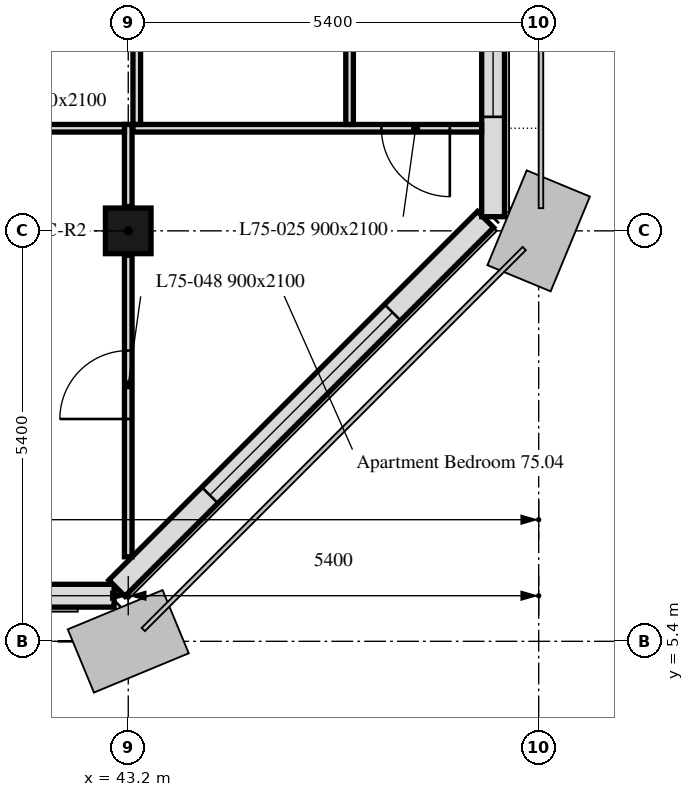
"""IFC4 building model, lengths in metres.
Left out: names, types, materials, properties, quantities, classifications, styles, units other than length and angle.
Written with IfcOpenShell. Run it as: python <this file> out.ifc"""

import sys

from ifc_helpers import new_model, si_unit, direction, frame, frame_2d, origin, origin_2d, place, context, subcontext, project, spatial, rectangle, extrude, element, fill, save


model = new_model("IFC4")
c1 = context("Model", 3, precision=1e-05, world=origin(), true_north=direction((0.0, 1.0)))
c2 = subcontext(c1, "Body", "Model", "MODEL_VIEW")
j1 = project(units=[si_unit("LENGTHUNIT", "METRE"), si_unit("PLANEANGLEUNIT", "RADIAN")], contexts=[c1])
p1 = place(None, origin())
s1 = spatial("IfcSite", under=j1, at=p1, CompositionType="ELEMENT")
p2 = place(p1, origin())
s2 = spatial("IfcBuilding", under=s1, at=p2, CompositionType="ELEMENT")
p3 = place(p2, frame((0.0, 0.0, 301.6)))
s3 = spatial("IfcBuildingStorey", under=s2, at=p3, CompositionType="ELEMENT", Elevation=301.6)
p4 = place(p3, frame((43.2, 10.8, 0.0), z_axis=(0.0, 0.0, 1.0), x_axis=(1.0, 0.0, 0.0)))
e1 = element("IfcColumn", 1, at=p4, inside=s3, PredefinedType="COLUMN", context=c2, shape_type="SweptSolid", body=[
    extrude(rectangle(XDim=0.6, YDim=0.6, at=origin_2d()), origin(), (0.0, 0.0, 1.0), 3.0),
])
p5 = place(p3, frame((10.986, 6.0, 0.0), z_axis=(0.0, 0.0, 1.0), x_axis=(1.0, 0.0, 0.0)))
e2 = element("IfcWall", 2, at=p5, inside=s3, PredefinedType="SOLIDWALL", context=c2, shape_type="SweptSolid", body=[
    extrude(rectangle(XDim=32.027, YDim=0.3, at=frame_2d((16.014, 0.0))), origin(), (0.0, 0.0, 1.0), 3.0),
])
p6 = place(p5, frame((0.814, 0.0, 0.9)))
e3 = element("IfcOpeningElement", 3, at=p6, cuts=e2, PredefinedType="OPENING", context=c2, shape_type="SweptSolid", body=[
    extrude(rectangle(XDim=3.4, YDim=1.7, at=frame_2d((1.7, 0.85))), frame((0.0, 0.16, 0.0), z_axis=(0.0, -1.0, 0.0), x_axis=(1.0, 0.0, 0.0)), (0.0, 0.0, 1.0), 0.32),
])
p7 = place(p5, frame((6.564, 0.0, 0.9)))
e4 = element("IfcOpeningElement", 4, at=p7, cuts=e2, PredefinedType="OPENING", context=c2, shape_type="SweptSolid", body=[
    extrude(rectangle(XDim=1.1, YDim=1.7, at=frame_2d((0.55, 0.85))), frame((0.0, 0.16, 0.0), z_axis=(0.0, -1.0, 0.0), x_axis=(1.0, 0.0, 0.0)), (0.0, 0.0, 1.0), 0.32),
])
p8 = place(p5, frame((11.614, 0.0, 0.9)))
e5 = element("IfcOpeningElement", 5, at=p8, cuts=e2, PredefinedType="OPENING", context=c2, shape_type="SweptSolid", body=[
    extrude(rectangle(XDim=3.4, YDim=1.7, at=frame_2d((1.7, 0.85))), frame((0.0, 0.16, 0.0), z_axis=(0.0, -1.0, 0.0), x_axis=(1.0, 0.0, 0.0)), (0.0, 0.0, 1.0), 0.32),
])
p9 = place(p5, frame((17.364, 0.0, 0.9)))
e6 = element("IfcOpeningElement", 6, at=p9, cuts=e2, PredefinedType="OPENING", context=c2, shape_type="SweptSolid", body=[
    extrude(rectangle(XDim=1.1, YDim=1.7, at=frame_2d((0.55, 0.85))), frame((0.0, 0.16, 0.0), z_axis=(0.0, -1.0, 0.0), x_axis=(1.0, 0.0, 0.0)), (0.0, 0.0, 1.0), 0.32),
])
p10 = place(p5, frame((22.414, 0.0, 0.9)))
e7 = element("IfcOpeningElement", 7, at=p10, cuts=e2, PredefinedType="OPENING", context=c2, shape_type="SweptSolid", body=[
    extrude(rectangle(XDim=3.4, YDim=1.7, at=frame_2d((1.7, 0.85))), frame((0.0, 0.16, 0.0), z_axis=(0.0, -1.0, 0.0), x_axis=(1.0, 0.0, 0.0)), (0.0, 0.0, 1.0), 0.32),
])
p11 = place(p5, frame((28.164, 0.0, 0.9)))
e8 = element("IfcOpeningElement", 8, at=p11, cuts=e2, PredefinedType="OPENING", context=c2, shape_type="SweptSolid", body=[
    extrude(rectangle(XDim=1.1, YDim=1.7, at=frame_2d((0.55, 0.85))), frame((0.0, 0.16, 0.0), z_axis=(0.0, -1.0, 0.0), x_axis=(1.0, 0.0, 0.0)), (0.0, 0.0, 1.0), 0.32),
])
p12 = place(p3, frame((43.051, 6.099, 0.0), z_axis=(0.0, 0.0, 1.0), x_axis=(0.707106781187, 0.707106781187, 0.0)))
e9 = element("IfcWall", 9, at=p12, inside=s3, PredefinedType="SOLIDWALL", context=c2, shape_type="SweptSolid", body=[
    extrude(rectangle(XDim=6.86, YDim=0.3, at=frame_2d((3.43, 0.0))), origin(), (0.0, 0.0, 1.0), 3.0),
])
p13 = place(p12, frame((1.73, 0.0, 0.9)))
e10 = element("IfcOpeningElement", 10, at=p13, cuts=e9, PredefinedType="OPENING", context=c2, shape_type="SweptSolid", body=[
    extrude(rectangle(XDim=3.4, YDim=1.7, at=frame_2d((1.7, 0.85))), frame((0.0, 0.16, 0.0), z_axis=(0.0, -1.0, 0.0), x_axis=(1.0, 0.0, 0.0)), (0.0, 0.0, 1.0), 0.32),
])
p14 = place(p3, frame((48.0, 10.986, 0.0), z_axis=(0.0, 0.0, 1.0), x_axis=(0.0, 1.0, 0.0)))
e11 = element("IfcWall", 11, at=p14, inside=s3, PredefinedType="SOLIDWALL", context=c2, shape_type="SweptSolid", body=[
    extrude(rectangle(XDim=32.027, YDim=0.3, at=frame_2d((16.014, 0.0))), origin(), (0.0, 0.0, 1.0), 3.0),
])
p15 = place(p14, frame((1.314, 0.0, 0.9)))
e12 = element("IfcOpeningElement", 12, at=p15, cuts=e11, PredefinedType="OPENING", context=c2, shape_type="SweptSolid", body=[
    extrude(rectangle(XDim=1.1, YDim=1.7, at=frame_2d((0.55, 0.85))), frame((0.0, 0.16, 0.0), z_axis=(0.0, -1.0, 0.0), x_axis=(1.0, 0.0, 0.0)), (0.0, 0.0, 1.0), 0.32),
])
p16 = place(p14, frame((2.589, 0.0, 0.9)))
e13 = element("IfcOpeningElement", 13, at=p16, cuts=e11, PredefinedType="OPENING", context=c2, shape_type="SweptSolid", body=[
    extrude(rectangle(XDim=0.65, YDim=1.7, at=frame_2d((0.325, 0.85))), frame((0.0, 0.16, 0.0), z_axis=(0.0, -1.0, 0.0), x_axis=(1.0, 0.0, 0.0)), (0.0, 0.0, 1.0), 0.32),
])
p17 = place(p14, frame((6.564, 0.0, 0.9)))
e14 = element("IfcOpeningElement", 14, at=p17, cuts=e11, PredefinedType="OPENING", context=c2, shape_type="SweptSolid", body=[
    extrude(rectangle(XDim=1.1, YDim=1.7, at=frame_2d((0.55, 0.85))), frame((0.0, 0.16, 0.0), z_axis=(0.0, -1.0, 0.0), x_axis=(1.0, 0.0, 0.0)), (0.0, 0.0, 1.0), 0.32),
])
p18 = place(p14, frame((8.164, 0.0, 0.9)))
e15 = element("IfcOpeningElement", 15, at=p18, cuts=e11, PredefinedType="OPENING", context=c2, shape_type="SweptSolid", body=[
    extrude(rectangle(XDim=1.1, YDim=1.7, at=frame_2d((0.55, 0.85))), frame((0.0, 0.16, 0.0), z_axis=(0.0, -1.0, 0.0), x_axis=(1.0, 0.0, 0.0)), (0.0, 0.0, 1.0), 0.32),
])
p19 = place(p14, frame((11.614, 0.0, 0.9)))
e16 = element("IfcOpeningElement", 16, at=p19, cuts=e11, PredefinedType="OPENING", context=c2, shape_type="SweptSolid", body=[
    extrude(rectangle(XDim=3.4, YDim=1.7, at=frame_2d((1.7, 0.85))), frame((0.0, 0.16, 0.0), z_axis=(0.0, -1.0, 0.0), x_axis=(1.0, 0.0, 0.0)), (0.0, 0.0, 1.0), 0.32),
])
p20 = place(p14, frame((17.364, 0.0, 0.9)))
e17 = element("IfcOpeningElement", 17, at=p20, cuts=e11, PredefinedType="OPENING", context=c2, shape_type="SweptSolid", body=[
    extrude(rectangle(XDim=1.1, YDim=1.7, at=frame_2d((0.55, 0.85))), frame((0.0, 0.16, 0.0), z_axis=(0.0, -1.0, 0.0), x_axis=(1.0, 0.0, 0.0)), (0.0, 0.0, 1.0), 0.32),
])
p21 = place(p14, frame((18.964, 0.0, 0.9)))
e18 = element("IfcOpeningElement", 18, at=p21, cuts=e11, PredefinedType="OPENING", context=c2, shape_type="SweptSolid", body=[
    extrude(rectangle(XDim=1.1, YDim=1.7, at=frame_2d((0.55, 0.85))), frame((0.0, 0.16, 0.0), z_axis=(0.0, -1.0, 0.0), x_axis=(1.0, 0.0, 0.0)), (0.0, 0.0, 1.0), 0.32),
])
p22 = place(p14, frame((23.389, 0.0, 0.9)))
e19 = element("IfcOpeningElement", 19, at=p22, cuts=e11, PredefinedType="OPENING", context=c2, shape_type="SweptSolid", body=[
    extrude(rectangle(XDim=0.65, YDim=1.7, at=frame_2d((0.325, 0.85))), frame((0.0, 0.16, 0.0), z_axis=(0.0, -1.0, 0.0), x_axis=(1.0, 0.0, 0.0)), (0.0, 0.0, 1.0), 0.32),
])
p23 = place(p14, frame((24.364, 0.0, 0.9)))
e20 = element("IfcOpeningElement", 20, at=p23, cuts=e11, PredefinedType="OPENING", context=c2, shape_type="SweptSolid", body=[
    extrude(rectangle(XDim=1.1, YDim=1.7, at=frame_2d((0.55, 0.85))), frame((0.0, 0.16, 0.0), z_axis=(0.0, -1.0, 0.0), x_axis=(1.0, 0.0, 0.0)), (0.0, 0.0, 1.0), 0.32),
])
p24 = place(p14, frame((28.164, 0.0, 0.9)))
e21 = element("IfcOpeningElement", 21, at=p24, cuts=e11, PredefinedType="OPENING", context=c2, shape_type="SweptSolid", body=[
    extrude(rectangle(XDim=1.1, YDim=1.7, at=frame_2d((0.55, 0.85))), frame((0.0, 0.16, 0.0), z_axis=(0.0, -1.0, 0.0), x_axis=(1.0, 0.0, 0.0)), (0.0, 0.0, 1.0), 0.32),
])
p25 = place(p14, frame((29.764, 0.0, 0.9)))
e22 = element("IfcOpeningElement", 22, at=p25, cuts=e11, PredefinedType="OPENING", context=c2, shape_type="SweptSolid", body=[
    extrude(rectangle(XDim=1.1, YDim=1.7, at=frame_2d((0.55, 0.85))), frame((0.0, 0.16, 0.0), z_axis=(0.0, -1.0, 0.0), x_axis=(1.0, 0.0, 0.0)), (0.0, 0.0, 1.0), 0.32),
])
p26 = place(p3, frame((43.2, 6.512, 0.0), z_axis=(0.0, 0.0, 1.0), x_axis=(0.0, 1.0, 0.0)))
e23 = element("IfcWall", 23, at=p26, inside=s3, PredefinedType="PARTITIONING", context=c2, shape_type="SweptSolid", body=[
    extrude(rectangle(XDim=3.968, YDim=0.1, at=frame_2d((1.984, 0.0))), origin(), (0.0, 0.0, 1.0), 3.0),
])
p27 = place(p26, frame((1.813, 0.0, 0.0)))
e24 = element("IfcOpeningElement", 24, at=p27, cuts=e23, PredefinedType="OPENING", context=c2, shape_type="SweptSolid", body=[
    extrude(rectangle(XDim=0.9, YDim=2.1, at=frame_2d((0.45, 1.05))), frame((0.0, 0.05, 0.0), z_axis=(0.0, -1.0, 0.0), x_axis=(1.0, 0.0, 0.0)), (0.0, 0.0, 1.0), 0.1),
])
p28 = place(p3, frame((43.2, 11.12, 0.0), z_axis=(0.0, 0.0, 1.0), x_axis=(0.0, 1.0, 0.0)))
e25 = element("IfcWall", 25, at=p28, inside=s3, PredefinedType="PARTITIONING", context=c2, shape_type="SweptSolid", body=[
    extrude(rectangle(XDim=1.08, YDim=0.1, at=frame_2d((0.54, 0.0))), origin(), (0.0, 0.0, 1.0), 3.0),
])
p29 = place(p3, frame((43.15, 12.15, 0.0), z_axis=(0.0, 0.0, 1.0), x_axis=(-1.0, 0.0, 0.0)))
e26 = element("IfcWall", 26, at=p29, inside=s3, PredefinedType="PARTITIONING", context=c2, shape_type="SweptSolid", body=[
    extrude(rectangle(XDim=5.275, YDim=0.1, at=frame_2d((2.637, 0.0))), origin(), (0.0, 0.0, 1.0), 3.0),
])
p30 = place(p29, frame((3.017, 0.0, 0.0)))
e27 = element("IfcOpeningElement", 27, at=p30, cuts=e26, PredefinedType="OPENING", context=c2, shape_type="SweptSolid", body=[
    extrude(rectangle(XDim=0.9, YDim=2.1, at=frame_2d((0.45, 1.05))), frame((0.0, 0.05, 0.0), z_axis=(0.0, -1.0, 0.0), x_axis=(1.0, 0.0, 0.0)), (0.0, 0.0, 1.0), 0.1),
])
p31 = place(p29, frame((1.517, 0.0, 0.0)))
e28 = element("IfcOpeningElement", 28, at=p31, cuts=e26, PredefinedType="OPENING", context=c2, shape_type="SweptSolid", body=[
    extrude(rectangle(XDim=0.9, YDim=2.1, at=frame_2d((0.45, 1.05))), frame((0.0, 0.05, 0.0), z_axis=(0.0, -1.0, 0.0), x_axis=(1.0, 0.0, 0.0)), (0.0, 0.0, 1.0), 0.1),
])
p32 = place(p3, frame((47.849, 12.15, 0.0), z_axis=(0.0, 0.0, 1.0), x_axis=(-1.0, 0.0, 0.0)))
e29 = element("IfcWall", 29, at=p32, inside=s3, PredefinedType="PARTITIONING", context=c2, shape_type="SweptSolid", body=[
    extrude(rectangle(XDim=4.587, YDim=0.1, at=frame_2d((2.293, 0.0))), origin(), (0.0, 0.0, 1.0), 3.0),
])
p33 = place(p32, frame((0.418, 0.0, 0.0)))
e30 = element("IfcOpeningElement", 30, at=p33, cuts=e29, PredefinedType="OPENING", context=c2, shape_type="SweptSolid", body=[
    extrude(rectangle(XDim=0.9, YDim=2.1, at=frame_2d((0.45, 1.05))), frame((0.0, 0.05, 0.0), z_axis=(0.0, -1.0, 0.0), x_axis=(1.0, 0.0, 0.0)), (0.0, 0.0, 1.0), 0.1),
])
p34 = place(p3, frame((43.312, 12.2, 0.0), z_axis=(0.0, 0.0, 1.0), x_axis=(0.0, 1.0, 0.0)))
e31 = element("IfcWall", 31, at=p34, inside=s3, PredefinedType="PARTITIONING", context=c2, shape_type="SweptSolid", body=[
    extrude(rectangle(XDim=2.125, YDim=0.1, at=frame_2d((1.062, 0.0))), origin(), (0.0, 0.0, 1.0), 3.0),
])
p35 = place(p34, frame((0.975, 0.0, 0.0)))
e32 = element("IfcOpeningElement", 32, at=p35, cuts=e31, PredefinedType="OPENING", context=c2, shape_type="SweptSolid", body=[
    extrude(rectangle(XDim=0.9, YDim=2.1, at=frame_2d((0.45, 1.05))), frame((0.0, 0.05, 0.0), z_axis=(0.0, -1.0, 0.0), x_axis=(1.0, 0.0, 0.0)), (0.0, 0.0, 1.0), 0.1),
])
p36 = place(p3, frame((46.112, 12.2, 0.0), z_axis=(0.0, 0.0, 1.0), x_axis=(0.0, 1.0, 0.0)))
e33 = element("IfcWall", 33, at=p36, inside=s3, PredefinedType="PARTITIONING", context=c2, shape_type="SweptSolid", body=[
    extrude(rectangle(XDim=2.125, YDim=0.1, at=frame_2d((1.062, 0.0))), origin(), (0.0, 0.0, 1.0), 3.0),
])
p37 = place(p13, origin())
e34 = element("IfcWindow", 34, at=p37, inside=s3, PartitioningType="SINGLE_PANEL", PredefinedType="WINDOW", context=c2, shape_type="SweptSolid", body=[
    extrude(rectangle(XDim=3.4, YDim=1.7, at=frame_2d((1.7, 0.85))), frame((0.0, 0.03, 0.0), z_axis=(0.0, -1.0, 0.0), x_axis=(1.0, 0.0, 0.0)), (0.0, 0.0, 1.0), 0.06),
])
fill(e10, e34)
p38 = place(p15, origin())
e35 = element("IfcWindow", 35, at=p38, inside=s3, PartitioningType="SINGLE_PANEL", PredefinedType="WINDOW", context=c2, shape_type="SweptSolid", body=[
    extrude(rectangle(XDim=1.1, YDim=1.7, at=frame_2d((0.55, 0.85))), frame((0.0, 0.03, 0.0), z_axis=(0.0, -1.0, 0.0), x_axis=(1.0, 0.0, 0.0)), (0.0, 0.0, 1.0), 0.06),
])
fill(e12, e35)
p39 = place(p33, origin())
e36 = element("IfcDoor", 36, at=p39, inside=s3, OperationType="SINGLE_SWING_LEFT", PredefinedType="DOOR", context=c2, shape_type="SweptSolid", body=[
    extrude(rectangle(XDim=0.9, YDim=2.1, at=frame_2d((0.45, 1.05))), frame((0.0, 0.025, 0.0), z_axis=(0.0, -1.0, 0.0), x_axis=(1.0, 0.0, 0.0)), (0.0, 0.0, 1.0), 0.05),
])
fill(e30, e36)
p40 = place(p27, origin())
e37 = element("IfcDoor", 37, at=p40, inside=s3, OperationType="SINGLE_SWING_RIGHT", PredefinedType="DOOR", context=c2, shape_type="SweptSolid", body=[
    extrude(rectangle(XDim=0.9, YDim=2.1, at=frame_2d((0.45, 1.05))), frame((0.0, 0.025, 0.0), z_axis=(0.0, -1.0, 0.0), x_axis=(1.0, 0.0, 0.0)), (0.0, 0.0, 1.0), 0.05),
])
fill(e24, e37)
save(model, sys.argv[1])
